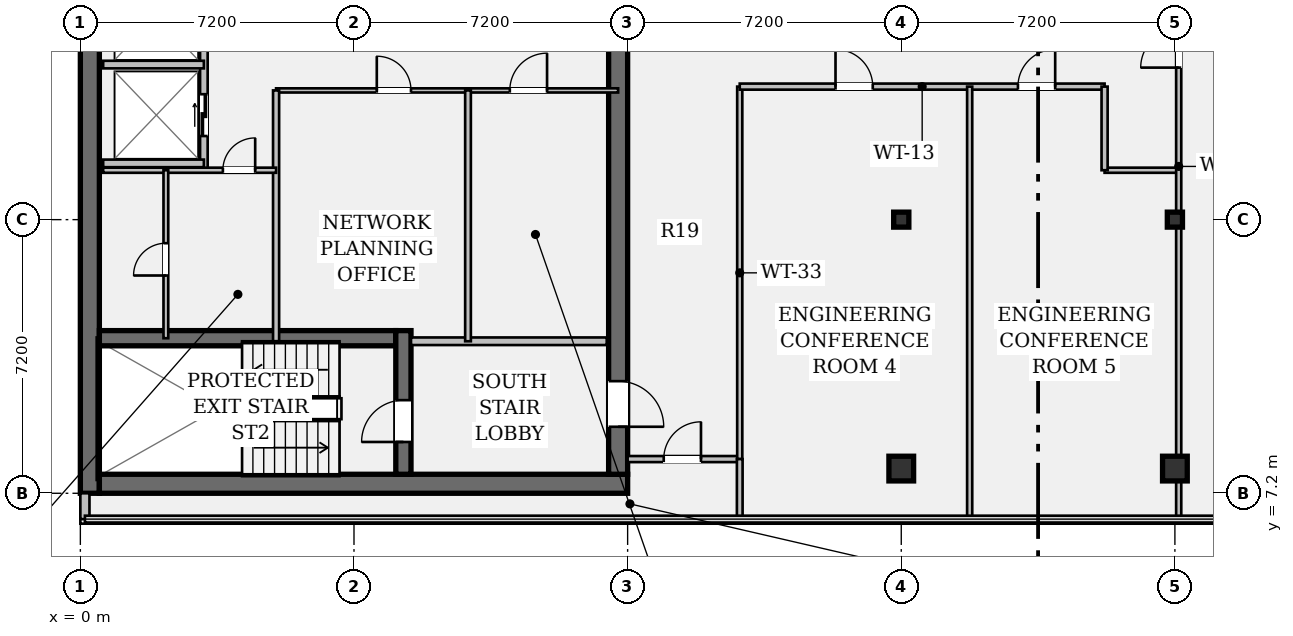
"""IFC4 building model, lengths in metres.
Left out: names, types, materials, properties, quantities, classifications, styles, units other than length and angle.
Written with IfcOpenShell. Run it as: python <this file> out.ifc"""

import sys

from ifc_helpers import new_model, si_unit, direction, frame, frame_2d, origin, origin_2d, place, context, subcontext, project, spatial, rectangle, hollow_rectangle, i_section, extrude, element, fill, save


model = new_model("IFC4")
c1 = context("Model", 3, precision=1e-05, world=origin(), true_north=direction((0.0, 1.0)))
c2 = subcontext(c1, "Body", "Model", "MODEL_VIEW")
j1 = project(units=[si_unit("LENGTHUNIT", "METRE"), si_unit("PLANEANGLEUNIT", "RADIAN")], contexts=[c1])
p1 = place(None, origin())
s1 = spatial("IfcSite", under=j1, at=p1, CompositionType="ELEMENT")
p2 = place(p1, origin())
s2 = spatial("IfcBuilding", under=s1, at=p2, CompositionType="ELEMENT")
p3 = place(p2, frame((0.0, 0.0, 262.15)))
s3 = spatial("IfcBuildingStorey", under=s2, at=p3, CompositionType="ELEMENT", Elevation=262.15)
p4 = place(p3, frame((0.25, 7.2, 0.0), z_axis=(0.0, 0.0, 1.0), x_axis=(0.0, 1.0, 0.0)))
e1 = element("IfcWall", 1, at=p4, inside=s3, PredefinedType="SHEAR", context=c2, shape_type="SweptSolid", body=[
    extrude(rectangle(XDim=28.8, YDim=0.5, at=frame_2d((14.4, 0.0))), origin(), (0.0, 0.0, 1.0), 3.24),
])
p5 = place(p3, frame((0.5, 7.45, 0.0), z_axis=(0.0, 0.0, 1.0), x_axis=(1.0, 0.0, 0.0)))
e2 = element("IfcWall", 2, at=p5, inside=s3, PredefinedType="SHEAR", context=c2, shape_type="SweptSolid", body=[
    extrude(rectangle(XDim=13.9, YDim=0.5, at=frame_2d((6.95, 0.0))), origin(), (0.0, 0.0, 1.0), 3.24),
])
p6 = place(p3, frame((14.15, 35.5, 0.0), z_axis=(0.0, 0.0, 1.0), x_axis=(0.0, -1.0, 0.0)))
e3 = element("IfcWall", 3, at=p6, inside=s3, PredefinedType="SHEAR", context=c2, shape_type="SweptSolid", body=[
    extrude(rectangle(XDim=27.8, YDim=0.5, at=frame_2d((13.9, 0.0))), origin(), (0.0, 0.0, 1.0), 3.24),
])
p7 = place(p6, frame((1.4, 0.0, 0.0)))
e4 = element("IfcOpeningElement", 4, at=p7, cuts=e3, PredefinedType="OPENING", context=c2, shape_type="SweptSolid", body=[
    extrude(rectangle(XDim=1.2, YDim=2.15, at=frame_2d((0.6, 1.075))), frame((0.0, 0.262, 0.0), z_axis=(0.0, -1.0, 0.0), x_axis=(1.0, 0.0, 0.0)), (0.0, 0.0, 1.0), 0.524),
])
p8 = place(p6, frame((25.35, 0.0, 0.0)))
e5 = element("IfcOpeningElement", 5, at=p8, cuts=e3, PredefinedType="OPENING", context=c2, shape_type="SweptSolid", body=[
    extrude(rectangle(XDim=1.2, YDim=2.15, at=frame_2d((0.6, 1.075))), frame((0.0, 0.262, 0.0), z_axis=(0.0, -1.0, 0.0), x_axis=(1.0, 0.0, 0.0)), (0.0, 0.0, 1.0), 0.524),
])
p9 = place(p6, frame((14.7, 0.0, 0.0)))
e6 = element("IfcOpeningElement", 6, at=p9, cuts=e3, PredefinedType="OPENING", context=c2, shape_type="SweptSolid", body=[
    extrude(rectangle(XDim=1.6, YDim=2.2, at=frame_2d((0.8, 1.1))), frame((0.0, 0.262, 0.0), z_axis=(0.0, -1.0, 0.0), x_axis=(1.0, 0.0, 0.0)), (0.0, 0.0, 1.0), 0.524),
])
p10 = place(p3, frame((0.5, 11.28, 0.0), z_axis=(0.0, 0.0, 1.0), x_axis=(1.0, 0.0, 0.0)))
e7 = element("IfcWall", 7, at=p10, inside=s3, PredefinedType="SHEAR", context=c2, shape_type="SweptSolid", body=[
    extrude(rectangle(XDim=7.8, YDim=0.4, at=frame_2d((3.9, 0.0))), origin(), (0.0, 0.0, 1.0), 3.24),
])
p11 = place(p3, frame((8.5, 7.7, 0.0), z_axis=(0.0, 0.0, 1.0), x_axis=(0.0, 1.0, 0.0)))
e8 = element("IfcWall", 8, at=p11, inside=s3, PredefinedType="SHEAR", context=c2, shape_type="SweptSolid", body=[
    extrude(rectangle(XDim=3.78, YDim=0.4, at=frame_2d((1.89, 0.0))), origin(), (0.0, 0.0, 1.0), 3.24),
])
p12 = place(p11, frame((0.85, 0.0, 0.0)))
e9 = element("IfcOpeningElement", 9, at=p12, cuts=e8, PredefinedType="OPENING", context=c2, shape_type="SweptSolid", body=[
    extrude(rectangle(XDim=1.1, YDim=2.15, at=frame_2d((0.55, 1.075))), frame((0.0, 0.212, 0.0), z_axis=(0.0, -1.0, 0.0), x_axis=(1.0, 0.0, 0.0)), (0.0, 0.0, 1.0), 0.424),
])
p13 = place(p3, frame((21.6, 7.85, 0.0), z_axis=(0.0, 0.0, 1.0), x_axis=(1.0, 0.0, 0.0)))
e10 = element("IfcColumn", 10, at=p13, inside=s3, PredefinedType="COLUMN", context=c2, shape_type="SweptSolid", body=[
    extrude(hollow_rectangle(XDim=0.65, YDim=0.65, WallThickness=0.04, at=origin_2d()), origin(), (0.0, 0.0, 1.0), 3.24),
])
p14 = place(p3, frame((21.6, 14.4, 0.0), z_axis=(0.0, 0.0, 1.0), x_axis=(1.0, 0.0, 0.0)))
e11 = element("IfcColumn", 11, at=p14, inside=s3, PredefinedType="COLUMN", context=c2, shape_type="SweptSolid", body=[
    extrude(i_section(OverallWidth=0.399, OverallDepth=0.394, WebThickness=0.023, FlangeThickness=0.037, FilletRadius=0.018, at=origin_2d()), origin(), (0.0, 0.0, 1.0), 3.24),
])
p15 = place(p3, frame((28.8, 7.85, 0.0), z_axis=(0.0, 0.0, 1.0), x_axis=(1.0, 0.0, 0.0)))
e12 = element("IfcColumn", 12, at=p15, inside=s3, PredefinedType="COLUMN", context=c2, shape_type="SweptSolid", body=[
    extrude(hollow_rectangle(XDim=0.65, YDim=0.65, WallThickness=0.04, at=origin_2d()), origin(), (0.0, 0.0, 1.0), 3.24),
])
p16 = place(p3, frame((28.8, 14.4, 0.0), z_axis=(0.0, 0.0, 1.0), x_axis=(1.0, 0.0, 0.0)))
e13 = element("IfcColumn", 13, at=p16, inside=s3, PredefinedType="COLUMN", context=c2, shape_type="SweptSolid", body=[
    extrude(i_section(OverallWidth=0.399, OverallDepth=0.394, WebThickness=0.023, FlangeThickness=0.037, FilletRadius=0.018, at=origin_2d()), origin(), (0.0, 0.0, 1.0), 3.24),
])
p17 = place(p3, frame((0.12, 6.52, 0.0), z_axis=(0.0, 0.0, 1.0), x_axis=(0.0, 1.0, 0.0)))
e14 = element("IfcWall", 14, at=p17, inside=s3, PredefinedType="STANDARD", context=c2, shape_type="SweptSolid", body=[
    extrude(rectangle(XDim=0.68, YDim=0.24, at=frame_2d((0.34, 0.0))), origin(), (0.0, 0.0, 1.0), 3.24),
])
p18 = place(p3, frame((8.7, 11.2, 0.0), z_axis=(0.0, 0.0, 1.0), x_axis=(1.0, 0.0, 0.0)))
e15 = element("IfcWall", 15, at=p18, inside=s3, PredefinedType="PARTITIONING", context=c2, shape_type="SweptSolid", body=[
    extrude(rectangle(XDim=5.15, YDim=0.2, at=frame_2d((2.575, 0.0))), origin(), (0.0, 0.0, 1.0), 3.24),
])
p19 = place(p3, frame((3.25, 15.7, 0.0), z_axis=(0.0, 0.0, 1.0), x_axis=(0.0, 1.0, 0.0)))
e16 = element("IfcWall", 16, at=p19, inside=s3, PredefinedType="PARTITIONING", context=c2, shape_type="SweptSolid", body=[
    extrude(rectangle(XDim=13.08, YDim=0.2, at=frame_2d((6.54, 0.0))), origin(), (0.0, 0.0, 1.0), 3.24),
])
p20 = place(p19, frame((0.9, 0.0, 0.0)))
e17 = element("IfcOpeningElement", 17, at=p20, cuts=e16, PredefinedType="OPENING", context=c2, shape_type="SweptSolid", body=[
    extrude(rectangle(XDim=1.1, YDim=2.2, at=frame_2d((0.55, 1.1))), frame((0.0, 0.112, 0.0), z_axis=(0.0, -1.0, 0.0), x_axis=(1.0, 0.0, 0.0)), (0.0, 0.0, 1.0), 0.224),
])
p21 = place(p19, frame((3.5, 0.0, 0.0)))
e18 = element("IfcOpeningElement", 18, at=p21, cuts=e16, PredefinedType="OPENING", context=c2, shape_type="SweptSolid", body=[
    extrude(rectangle(XDim=1.1, YDim=2.2, at=frame_2d((0.55, 1.1))), frame((0.0, 0.112, 0.0), z_axis=(0.0, -1.0, 0.0), x_axis=(1.0, 0.0, 0.0)), (0.0, 0.0, 1.0), 0.224),
])
p22 = place(p19, frame((7.2, 0.0, 0.0)))
e19 = element("IfcOpeningElement", 19, at=p22, cuts=e16, PredefinedType="OPENING", context=c2, shape_type="SweptSolid", body=[
    extrude(rectangle(XDim=1.1, YDim=2.2, at=frame_2d((0.55, 1.1))), frame((0.0, 0.112, 0.0), z_axis=(0.0, -1.0, 0.0), x_axis=(1.0, 0.0, 0.0)), (0.0, 0.0, 1.0), 0.224),
])
p23 = place(p19, frame((9.8, 0.0, 0.0)))
e20 = element("IfcOpeningElement", 20, at=p23, cuts=e16, PredefinedType="OPENING", context=c2, shape_type="SweptSolid", body=[
    extrude(rectangle(XDim=1.1, YDim=2.2, at=frame_2d((0.55, 1.1))), frame((0.0, 0.112, 0.0), z_axis=(0.0, -1.0, 0.0), x_axis=(1.0, 0.0, 0.0)), (0.0, 0.0, 1.0), 0.224),
])
for number, where, z_axis, x_axis in (
    (21, (0.6, 15.88, 0.0), (0.0, 0.0, 1.0), (1.0, 0.0, 0.0)),
    (22, (0.6, 18.48, 0.0), (0.0, 0.0, 1.0), (1.0, 0.0, 0.0)),
):
    element("IfcWall", number, at=place(p3, frame(where, z_axis=z_axis, x_axis=x_axis)), inside=s3, PredefinedType="PARTITIONING", context=c2, shape_type="SweptSolid", body=[
        extrude(rectangle(XDim=2.65, YDim=0.2, at=frame_2d((1.325, 0.0))), origin(), (0.0, 0.0, 1.0), 3.24),
    ])
p24 = place(p3, frame((5.15, 17.8, 0.0), z_axis=(0.0, 0.0, 1.0), x_axis=(1.0, 0.0, 0.0)))
e23 = element("IfcWall", 23, at=p24, inside=s3, PredefinedType="PARTITIONING", context=c2, shape_type="SweptSolid", body=[
    extrude(rectangle(XDim=9.0, YDim=0.11, at=frame_2d((4.5, 0.0))), origin(), (0.0, 0.0, 1.0), 3.24),
])
p25 = place(p24, frame((2.65, 0.0, 0.0)))
e24 = element("IfcOpeningElement", 24, at=p25, cuts=e23, PredefinedType="OPENING", context=c2, shape_type="SweptSolid", body=[
    extrude(rectangle(XDim=0.9, YDim=2.15, at=frame_2d((0.45, 1.075))), frame((0.0, 0.067, 0.0), z_axis=(0.0, -1.0, 0.0), x_axis=(1.0, 0.0, 0.0)), (0.0, 0.0, 1.0), 0.134),
])
p26 = place(p24, frame((6.15, 0.0, 0.0)))
e25 = element("IfcOpeningElement", 25, at=p26, cuts=e23, PredefinedType="OPENING", context=c2, shape_type="SweptSolid", body=[
    extrude(rectangle(XDim=0.98, YDim=2.15, at=frame_2d((0.49, 1.075))), frame((0.0, 0.067, 0.0), z_axis=(0.0, -1.0, 0.0), x_axis=(1.0, 0.0, 0.0)), (0.0, 0.0, 1.0), 0.134),
])
p27 = place(p3, frame((5.15, 11.2, 0.0), z_axis=(0.0, 0.0, 1.0), x_axis=(0.0, 1.0, 0.0)))
e26 = element("IfcWall", 26, at=p27, inside=s3, PredefinedType="PARTITIONING", context=c2, shape_type="SweptSolid", body=[
    extrude(rectangle(XDim=6.6, YDim=0.16, at=frame_2d((3.3, 0.0))), origin(), (0.0, 0.0, 1.0), 3.24),
])
p28 = place(p3, frame((10.2, 11.2, 0.0), z_axis=(0.0, 0.0, 1.0), x_axis=(0.0, 1.0, 0.0)))
e27 = element("IfcWall", 27, at=p28, inside=s3, PredefinedType="PARTITIONING", context=c2, shape_type="SweptSolid", body=[
    extrude(rectangle(XDim=6.6, YDim=0.15, at=frame_2d((3.3, 0.0))), origin(), (0.0, 0.0, 1.0), 3.24),
])
p29 = place(p3, frame((0.6, 15.7, 0.0), z_axis=(0.0, 0.0, 1.0), x_axis=(1.0, 0.0, 0.0)))
e28 = element("IfcWall", 28, at=p29, inside=s3, PredefinedType="PARTITIONING", context=c2, shape_type="SweptSolid", body=[
    extrude(rectangle(XDim=4.55, YDim=0.135, at=frame_2d((2.275, 0.0))), origin(), (0.0, 0.0, 1.0), 3.24),
])
p30 = place(p29, frame((3.15, 0.0, 0.0)))
e29 = element("IfcOpeningElement", 29, at=p30, cuts=e28, PredefinedType="OPENING", context=c2, shape_type="SweptSolid", body=[
    extrude(rectangle(XDim=0.85, YDim=2.15, at=frame_2d((0.425, 1.075))), frame((0.0, 0.08, 0.0), z_axis=(0.0, -1.0, 0.0), x_axis=(1.0, 0.0, 0.0)), (0.0, 0.0, 1.0), 0.159),
])
p31 = place(p3, frame((2.25, 11.28, 0.0), z_axis=(0.0, 0.0, 1.0), x_axis=(0.0, 1.0, 0.0)))
e30 = element("IfcWall", 30, at=p31, inside=s3, PredefinedType="PARTITIONING", context=c2, shape_type="SweptSolid", body=[
    extrude(rectangle(XDim=4.42, YDim=0.125, at=frame_2d((2.21, 0.0))), origin(), (0.0, 0.0, 1.0), 3.24),
])
p32 = place(p31, frame((1.65, 0.0, 0.0)))
e31 = element("IfcOpeningElement", 31, at=p32, cuts=e30, PredefinedType="OPENING", context=c2, shape_type="SweptSolid", body=[
    extrude(rectangle(XDim=0.85, YDim=2.15, at=frame_2d((0.425, 1.075))), frame((0.0, 0.074, 0.0), z_axis=(0.0, -1.0, 0.0), x_axis=(1.0, 0.0, 0.0)), (0.0, 0.0, 1.0), 0.149),
])
p33 = place(p3, frame((14.4, 8.1, 0.0), z_axis=(0.0, 0.0, 1.0), x_axis=(1.0, 0.0, 0.0)))
e32 = element("IfcWall", 32, at=p33, inside=s3, PredefinedType="PARTITIONING", context=c2, shape_type="SweptSolid", body=[
    extrude(rectangle(XDim=2.95, YDim=0.16, at=frame_2d((1.475, 0.0))), origin(), (0.0, 0.0, 1.0), 3.24),
])
p34 = place(p33, frame((0.95, 0.0, 0.0)))
e33 = element("IfcOpeningElement", 33, at=p34, cuts=e32, PredefinedType="OPENING", context=c2, shape_type="SweptSolid", body=[
    extrude(rectangle(XDim=0.98, YDim=2.15, at=frame_2d((0.49, 1.075))), frame((0.0, 0.092, 0.0), z_axis=(0.0, -1.0, 0.0), x_axis=(1.0, 0.0, 0.0)), (0.0, 0.0, 1.0), 0.184),
])
p35 = place(p3, frame((17.35, 8.1, 0.0), z_axis=(0.0, 0.0, 1.0), x_axis=(0.0, 1.0, 0.0)))
e34 = element("IfcWall", 34, at=p35, inside=s3, PredefinedType="PARTITIONING", context=c2, shape_type="SweptSolid", body=[
    extrude(rectangle(XDim=9.8, YDim=0.135, at=frame_2d((4.9, 0.0))), origin(), (0.0, 0.0, 1.0), 2.676),
])
p36 = place(p3, frame((17.35, 17.9, 0.0), z_axis=(0.0, 0.0, 1.0), x_axis=(1.0, 0.0, 0.0)))
e35 = element("IfcWall", 35, at=p36, inside=s3, PredefinedType="PARTITIONING", context=c2, shape_type="SweptSolid", body=[
    extrude(rectangle(XDim=9.6, YDim=0.16, at=frame_2d((4.8, 0.0))), origin(), (0.0, 0.0, 1.0), 2.676),
])
p37 = place(p36, frame((2.52, 0.0, 0.0)))
e36 = element("IfcOpeningElement", 36, at=p37, cuts=e35, PredefinedType="OPENING", context=c2, shape_type="SweptSolid", body=[
    extrude(rectangle(XDim=0.98, YDim=2.15, at=frame_2d((0.49, 1.075))), frame((0.0, 0.092, 0.0), z_axis=(0.0, -1.0, 0.0), x_axis=(1.0, 0.0, 0.0)), (0.0, 0.0, 1.0), 0.184),
])
p38 = place(p36, frame((7.32, 0.0, 0.0)))
e37 = element("IfcOpeningElement", 37, at=p38, cuts=e35, PredefinedType="OPENING", context=c2, shape_type="SweptSolid", body=[
    extrude(rectangle(XDim=0.98, YDim=2.15, at=frame_2d((0.49, 1.075))), frame((0.0, 0.092, 0.0), z_axis=(0.0, -1.0, 0.0), x_axis=(1.0, 0.0, 0.0)), (0.0, 0.0, 1.0), 0.184),
])
p39 = place(p3, frame((26.95, 15.7, 0.0), z_axis=(0.0, 0.0, 1.0), x_axis=(1.0, 0.0, 0.0)))
e38 = element("IfcWall", 38, at=p39, inside=s3, PredefinedType="PARTITIONING", context=c2, shape_type="SweptSolid", body=[
    extrude(rectangle(XDim=1.95, YDim=0.135, at=frame_2d((0.975, 0.0))), origin(), (0.0, 0.0, 1.0), 2.676),
])
p40 = place(p3, frame((26.95, 15.7, 0.0), z_axis=(0.0, 0.0, 1.0), x_axis=(0.0, 1.0, 0.0)))
e39 = element("IfcWall", 39, at=p40, inside=s3, PredefinedType="PARTITIONING", context=c2, shape_type="SweptSolid", body=[
    extrude(rectangle(XDim=2.2, YDim=0.16, at=frame_2d((1.1, 0.0))), origin(), (0.0, 0.0, 1.0), 3.24),
])
p41 = place(p3, frame((28.9, 6.52, 0.0), z_axis=(0.0, 0.0, 1.0), x_axis=(0.0, 1.0, 0.0)))
e40 = element("IfcWall", 40, at=p41, inside=s3, PredefinedType="PARTITIONING", context=c2, shape_type="SweptSolid", body=[
    extrude(rectangle(XDim=18.56, YDim=0.135, at=frame_2d((9.28, 0.0))), origin(), (0.0, 0.0, 1.0), 2.676),
])
p42 = place(p41, frame((11.88, 0.0, 0.0)))
e41 = element("IfcOpeningElement", 41, at=p42, cuts=e40, PredefinedType="OPENING", context=c2, shape_type="SweptSolid", body=[
    extrude(rectangle(XDim=1.0, YDim=2.15, at=frame_2d((0.5, 1.075))), frame((0.0, 0.08, 0.0), z_axis=(0.0, -1.0, 0.0), x_axis=(1.0, 0.0, 0.0)), (0.0, 0.0, 1.0), 0.159),
])
p43 = place(p3, frame((17.35, 6.52, 0.0), z_axis=(0.0, 0.0, 1.0), x_axis=(0.0, 1.0, 0.0)))
e42 = element("IfcWall", 42, at=p43, inside=s3, PredefinedType="PARTITIONING", context=c2, shape_type="SweptSolid", body=[
    extrude(rectangle(XDim=1.58, YDim=0.15, at=frame_2d((0.79, 0.0))), origin(), (0.0, 0.0, 1.0), 3.24),
])
p44 = place(p3, frame((23.4, 6.52, 0.0), z_axis=(0.0, 0.0, 1.0), x_axis=(0.0, 1.0, 0.0)))
e43 = element("IfcWall", 43, at=p44, inside=s3, PredefinedType="PARTITIONING", context=c2, shape_type="SweptSolid", body=[
    extrude(rectangle(XDim=11.38, YDim=0.135, at=frame_2d((5.69, 0.0))), origin(), (0.0, 0.0, 1.0), 2.676),
])
p45 = place(p12, origin())
e44 = element("IfcDoor", 44, at=p45, inside=s3, OperationType="SINGLE_SWING_LEFT", PredefinedType="DOOR", context=c2, shape_type="SweptSolid", body=[
    extrude(rectangle(XDim=1.1, YDim=2.15, at=frame_2d((0.55, 1.075))), frame((0.0, 0.025, 0.0), z_axis=(0.0, -1.0, 0.0), x_axis=(1.0, 0.0, 0.0)), (0.0, 0.0, 1.0), 0.05),
])
fill(e9, e44)
p46 = place(p8, origin())
e45 = element("IfcDoor", 45, at=p46, inside=s3, OperationType="SINGLE_SWING_RIGHT", PredefinedType="DOOR", context=c2, shape_type="SweptSolid", body=[
    extrude(rectangle(XDim=1.2, YDim=2.15, at=frame_2d((0.6, 1.075))), frame((0.0, 0.025, 0.0), z_axis=(0.0, -1.0, 0.0), x_axis=(1.0, 0.0, 0.0)), (0.0, 0.0, 1.0), 0.05),
])
fill(e5, e45)
p47 = place(p20, origin())
e46 = element("IfcDoor", 46, at=p47, inside=s3, OperationType="DOUBLE_DOOR_SLIDING", PredefinedType="DOOR", context=c2, shape_type="SweptSolid", body=[
    extrude(rectangle(XDim=1.1, YDim=2.2, at=frame_2d((0.55, 1.1))), frame((0.0, 0.025, 0.0), z_axis=(0.0, -1.0, 0.0), x_axis=(1.0, 0.0, 0.0)), (0.0, 0.0, 1.0), 0.05),
])
fill(e17, e46)
p48 = place(p25, origin())
e47 = element("IfcDoor", 47, at=p48, inside=s3, OperationType="SINGLE_SWING_LEFT", PredefinedType="DOOR", context=c2, shape_type="SweptSolid", body=[
    extrude(rectangle(XDim=0.9, YDim=2.15, at=frame_2d((0.45, 1.075))), frame((0.0, 0.025, 0.0), z_axis=(0.0, -1.0, 0.0), x_axis=(1.0, 0.0, 0.0)), (0.0, 0.0, 1.0), 0.05),
])
fill(e24, e47)
p49 = place(p26, origin())
e48 = element("IfcDoor", 48, at=p49, inside=s3, OperationType="SINGLE_SWING_RIGHT", PredefinedType="DOOR", context=c2, shape_type="SweptSolid", body=[
    extrude(rectangle(XDim=0.98, YDim=2.15, at=frame_2d((0.49, 1.075))), frame((0.0, 0.025, 0.0), z_axis=(0.0, -1.0, 0.0), x_axis=(1.0, 0.0, 0.0)), (0.0, 0.0, 1.0), 0.05),
])
fill(e25, e48)
p50 = place(p30, origin())
e49 = element("IfcDoor", 49, at=p50, inside=s3, OperationType="SINGLE_SWING_RIGHT", PredefinedType="DOOR", context=c2, shape_type="SweptSolid", body=[
    extrude(rectangle(XDim=0.85, YDim=2.15, at=frame_2d((0.425, 1.075))), frame((0.0, 0.025, 0.0), z_axis=(0.0, -1.0, 0.0), x_axis=(1.0, 0.0, 0.0)), (0.0, 0.0, 1.0), 0.05),
])
fill(e29, e49)
p51 = place(p32, origin())
e50 = element("IfcDoor", 50, at=p51, inside=s3, OperationType="SINGLE_SWING_LEFT", PredefinedType="DOOR", context=c2, shape_type="SweptSolid", body=[
    extrude(rectangle(XDim=0.85, YDim=2.15, at=frame_2d((0.425, 1.075))), frame((0.0, 0.025, 0.0), z_axis=(0.0, -1.0, 0.0), x_axis=(1.0, 0.0, 0.0)), (0.0, 0.0, 1.0), 0.05),
])
fill(e31, e50)
p52 = place(p34, origin())
e51 = element("IfcDoor", 51, at=p52, inside=s3, OperationType="SINGLE_SWING_RIGHT", PredefinedType="DOOR", context=c2, shape_type="SweptSolid", body=[
    extrude(rectangle(XDim=0.98, YDim=2.15, at=frame_2d((0.49, 1.075))), frame((0.0, 0.025, 0.0), z_axis=(0.0, -1.0, 0.0), x_axis=(1.0, 0.0, 0.0)), (0.0, 0.0, 1.0), 0.05),
])
fill(e33, e51)
p53 = place(p37, origin())
e52 = element("IfcDoor", 52, at=p53, inside=s3, OperationType="SINGLE_SWING_LEFT", PredefinedType="DOOR", context=c2, shape_type="SweptSolid", body=[
    extrude(rectangle(XDim=0.98, YDim=2.15, at=frame_2d((0.49, 1.075))), frame((0.0, 0.025, 0.0), z_axis=(0.0, -1.0, 0.0), x_axis=(1.0, 0.0, 0.0)), (0.0, 0.0, 1.0), 0.05),
])
fill(e36, e52)
p54 = place(p38, origin())
e53 = element("IfcDoor", 53, at=p54, inside=s3, OperationType="SINGLE_SWING_RIGHT", PredefinedType="DOOR", context=c2, shape_type="SweptSolid", body=[
    extrude(rectangle(XDim=0.98, YDim=2.15, at=frame_2d((0.49, 1.075))), frame((0.0, 0.025, 0.0), z_axis=(0.0, -1.0, 0.0), x_axis=(1.0, 0.0, 0.0)), (0.0, 0.0, 1.0), 0.05),
])
fill(e37, e53)
p55 = place(p42, origin())
e54 = element("IfcDoor", 54, at=p55, inside=s3, OperationType="SINGLE_SWING_LEFT", PredefinedType="DOOR", context=c2, shape_type="SweptSolid", body=[
    extrude(rectangle(XDim=1.0, YDim=2.15, at=frame_2d((0.5, 1.075))), frame((0.0, 0.025, 0.0), z_axis=(0.0, -1.0, 0.0), x_axis=(1.0, 0.0, 0.0)), (0.0, 0.0, 1.0), 0.05),
])
fill(e41, e54)
save(model, sys.argv[1])
